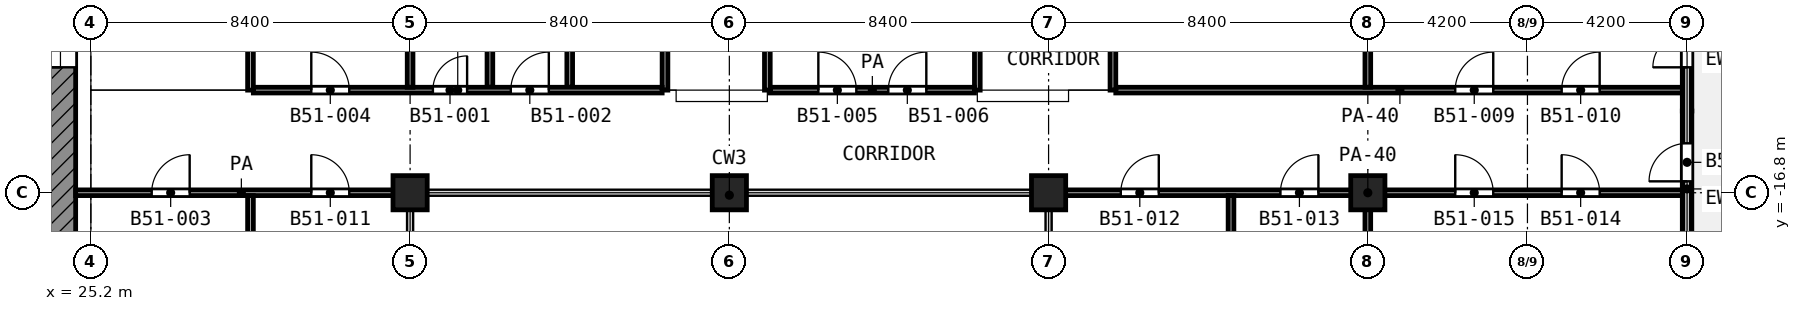
"""IFC4 building model, lengths in metres.
Left out: names, types, materials, properties, quantities, classifications, styles, units other than length and angle.
Written with IfcOpenShell. Run it as: python <this file> out.ifc"""

import sys

from ifc_helpers import new_model, si_unit, direction, frame, frame_2d, origin, origin_2d, place, context, subcontext, project, spatial, rectangle, extrude, element, fill, save


model = new_model("IFC4")
c1 = context("Model", 3, precision=1e-05, world=origin(), true_north=direction((0.0, 1.0)))
c2 = subcontext(c1, "Body", "Model", "MODEL_VIEW")
j1 = project(units=[si_unit("LENGTHUNIT", "METRE"), si_unit("PLANEANGLEUNIT", "RADIAN")], contexts=[c1])
p1 = place(None, origin())
s1 = spatial("IfcSite", under=j1, at=p1, CompositionType="ELEMENT")
p2 = place(p1, origin())
s2 = spatial("IfcBuilding", under=s1, at=p2, CompositionType="ELEMENT")
p3 = place(p2, frame((0.0, 0.0, 222.2)))
s3 = spatial("IfcBuildingStorey", under=s2, at=p3, CompositionType="ELEMENT", Elevation=222.2)
for number, where, z_axis, x_axis in (
    (1, (33.6, -16.8, 0.0), (0.0, 0.0, 1.0), (1.0, 0.0, 0.0)),
    (2, (42.0, -16.8, 0.0), (0.0, 0.0, 1.0), (1.0, 0.0, 0.0)),
    (3, (50.4, -16.8, 0.0), (0.0, 0.0, 1.0), (1.0, 0.0, 0.0)),
    (4, (58.8, -16.8, 0.0), (0.0, 0.0, 1.0), (1.0, 0.0, 0.0)),
):
    element("IfcColumn", number, at=place(p3, frame(where, z_axis=z_axis, x_axis=x_axis)), inside=s3, PredefinedType="COLUMN", context=c2, shape_type="SweptSolid", body=[
        extrude(rectangle(XDim=0.9, YDim=0.9, at=origin_2d()), origin(), (0.0, 0.0, 1.0), 4.2),
    ])
p4 = place(p3, frame((67.2, -18.75, 0.0), z_axis=(0.0, 0.0, 1.0), x_axis=(0.0, 1.0, 0.0)))
e5 = element("IfcWall", 5, at=p4, inside=s3, PredefinedType="SOLIDWALL", context=c2, shape_type="SweptSolid", body=[
    extrude(rectangle(XDim=4.1, YDim=0.25, at=frame_2d((2.05, 0.0))), origin(), (0.0, 0.0, 1.0), 2.58),
])
p5 = place(p4, frame((2.25, 0.0, 0.0)))
e6 = element("IfcOpeningElement", 6, at=p5, cuts=e5, PredefinedType="OPENING", context=c2, shape_type="SweptSolid", body=[
    extrude(rectangle(XDim=1.0, YDim=2.1, at=frame_2d((0.5, 1.05))), frame((0.0, 0.135, 0.0), z_axis=(0.0, -1.0, 0.0), x_axis=(1.0, 0.0, 0.0)), (0.0, 0.0, 1.0), 0.27),
])
p6 = place(p3, frame((67.2, -14.65, 0.0), z_axis=(0.0, 0.0, 1.0), x_axis=(0.0, 1.0, 0.0)))
e7 = element("IfcWall", 7, at=p6, inside=s3, PredefinedType="SOLIDWALL", context=c2, shape_type="SweptSolid", body=[
    extrude(rectangle(XDim=4.1, YDim=0.25, at=frame_2d((2.05, 0.0))), origin(), (0.0, 0.0, 1.0), 2.58),
])
p7 = place(p6, frame((1.15, 0.0, 0.0)))
e8 = element("IfcOpeningElement", 8, at=p7, cuts=e7, PredefinedType="OPENING", context=c2, shape_type="SweptSolid", body=[
    extrude(rectangle(XDim=1.8, YDim=2.1, at=frame_2d((0.9, 1.05))), frame((0.0, 0.135, 0.0), z_axis=(0.0, -1.0, 0.0), x_axis=(1.0, 0.0, 0.0)), (0.0, 0.0, 1.0), 0.27),
])
p8 = place(p3, frame((24.4, -24.0, 0.0), z_axis=(0.0, 0.0, 1.0), x_axis=(0.0, 1.0, 0.0)))
e9 = element("IfcWall", 9, at=p8, inside=s3, PredefinedType="SHEAR", context=c2, shape_type="SweptSolid", body=[
    extrude(rectangle(XDim=18.6, YDim=0.8, at=frame_2d((9.3, 0.0))), origin(), (0.0, 0.0, 1.0), 3.6),
])
p9 = place(p8, frame((10.5, 0.0, 0.0)))
e10 = element("IfcOpeningElement", 10, at=p9, cuts=e9, PredefinedType="OPENING", context=c2, shape_type="SweptSolid", body=[
    extrude(rectangle(XDim=1.8, YDim=2.1, at=frame_2d((0.9, 1.05))), frame((0.0, 0.41, 0.0), z_axis=(0.0, -1.0, 0.0), x_axis=(1.0, 0.0, 0.0)), (0.0, 0.0, 1.0), 0.82),
])
p10 = place(p3, frame((24.8, -16.8, 0.0), z_axis=(0.0, 0.0, 1.0), x_axis=(1.0, 0.0, 0.0)))
e11 = element("IfcWall", 11, at=p10, inside=s3, PredefinedType="PARTITIONING", context=c2, shape_type="SweptSolid", body=[
    extrude(rectangle(XDim=8.72, YDim=0.15, at=frame_2d((4.36, 0.0))), origin(), (0.0, 0.0, 1.0), 3.6),
])
p11 = place(p10, frame((2.0, 0.0, 0.0)))
e12 = element("IfcOpeningElement", 12, at=p11, cuts=e11, PredefinedType="OPENING", context=c2, shape_type="SweptSolid", body=[
    extrude(rectangle(XDim=1.0, YDim=2.1, at=frame_2d((0.5, 1.05))), frame((0.0, 0.085, 0.0), z_axis=(0.0, -1.0, 0.0), x_axis=(1.0, 0.0, 0.0)), (0.0, 0.0, 1.0), 0.17),
])
p12 = place(p10, frame((6.2, 0.0, 0.0)))
e13 = element("IfcOpeningElement", 13, at=p12, cuts=e11, PredefinedType="OPENING", context=c2, shape_type="SweptSolid", body=[
    extrude(rectangle(XDim=1.0, YDim=2.1, at=frame_2d((0.5, 1.05))), frame((0.0, 0.085, 0.0), z_axis=(0.0, -1.0, 0.0), x_axis=(1.0, 0.0, 0.0)), (0.0, 0.0, 1.0), 0.17),
])
p13 = place(p3, frame((50.48, -16.8, 0.0), z_axis=(0.0, 0.0, 1.0), x_axis=(1.0, 0.0, 0.0)))
e14 = element("IfcWall", 14, at=p13, inside=s3, PredefinedType="PARTITIONING", context=c2, shape_type="SweptSolid", body=[
    extrude(rectangle(XDim=16.64, YDim=0.15, at=frame_2d((8.32, 0.0))), origin(), (0.0, 0.0, 1.0), 2.7),
])
p14 = place(p13, frame((1.82, 0.0, 0.0)))
e15 = element("IfcOpeningElement", 15, at=p14, cuts=e14, PredefinedType="OPENING", context=c2, shape_type="SweptSolid", body=[
    extrude(rectangle(XDim=1.0, YDim=2.1, at=frame_2d((0.5, 1.05))), frame((0.0, 0.085, 0.0), z_axis=(0.0, -1.0, 0.0), x_axis=(1.0, 0.0, 0.0)), (0.0, 0.0, 1.0), 0.17),
])
p15 = place(p13, frame((6.02, 0.0, 0.0)))
e16 = element("IfcOpeningElement", 16, at=p15, cuts=e14, PredefinedType="OPENING", context=c2, shape_type="SweptSolid", body=[
    extrude(rectangle(XDim=1.0, YDim=2.1, at=frame_2d((0.5, 1.05))), frame((0.0, 0.085, 0.0), z_axis=(0.0, -1.0, 0.0), x_axis=(1.0, 0.0, 0.0)), (0.0, 0.0, 1.0), 0.17),
])
p16 = place(p13, frame((13.42, 0.0, 0.0)))
e17 = element("IfcOpeningElement", 17, at=p16, cuts=e14, PredefinedType="OPENING", context=c2, shape_type="SweptSolid", body=[
    extrude(rectangle(XDim=1.0, YDim=2.1, at=frame_2d((0.5, 1.05))), frame((0.0, 0.085, 0.0), z_axis=(0.0, -1.0, 0.0), x_axis=(1.0, 0.0, 0.0)), (0.0, 0.0, 1.0), 0.17),
])
p17 = place(p13, frame((10.62, 0.0, 0.0)))
e18 = element("IfcOpeningElement", 18, at=p17, cuts=e14, PredefinedType="OPENING", context=c2, shape_type="SweptSolid", body=[
    extrude(rectangle(XDim=1.0, YDim=2.1, at=frame_2d((0.5, 1.05))), frame((0.0, 0.085, 0.0), z_axis=(0.0, -1.0, 0.0), x_axis=(1.0, 0.0, 0.0)), (0.0, 0.0, 1.0), 0.17),
])
p18 = place(p3, frame((29.475, -14.1, 0.0), z_axis=(0.0, 0.0, 1.0), x_axis=(1.0, 0.0, 0.0)))
e19 = element("IfcWall", 19, at=p18, inside=s3, PredefinedType="PARTITIONING", context=c2, shape_type="SweptSolid", body=[
    extrude(rectangle(XDim=10.757, YDim=0.15, at=frame_2d((5.378, 0.0))), origin(), (0.0, 0.0, 1.0), 3.6),
])
p19 = place(p18, frame((1.525, 0.0, 0.0)))
e20 = element("IfcOpeningElement", 20, at=p19, cuts=e19, PredefinedType="OPENING", context=c2, shape_type="SweptSolid", body=[
    extrude(rectangle(XDim=1.0, YDim=2.1, at=frame_2d((0.5, 1.05))), frame((0.0, 0.085, 0.0), z_axis=(0.0, -1.0, 0.0), x_axis=(1.0, 0.0, 0.0)), (0.0, 0.0, 1.0), 0.17),
])
p20 = place(p18, frame((4.725, 0.0, 0.0)))
e21 = element("IfcOpeningElement", 21, at=p20, cuts=e19, PredefinedType="OPENING", context=c2, shape_type="SweptSolid", body=[
    extrude(rectangle(XDim=0.9, YDim=2.1, at=frame_2d((0.45, 1.05))), frame((0.0, 0.085, 0.0), z_axis=(0.0, -1.0, 0.0), x_axis=(1.0, 0.0, 0.0)), (0.0, 0.0, 1.0), 0.17),
])
p21 = place(p18, frame((6.775, 0.0, 0.0)))
e22 = element("IfcOpeningElement", 22, at=p21, cuts=e19, PredefinedType="OPENING", context=c2, shape_type="SweptSolid", body=[
    extrude(rectangle(XDim=1.0, YDim=2.1, at=frame_2d((0.5, 1.05))), frame((0.0, 0.085, 0.0), z_axis=(0.0, -1.0, 0.0), x_axis=(1.0, 0.0, 0.0)), (0.0, 0.0, 1.0), 0.17),
])
p22 = place(p3, frame((43.075, -14.1, 0.0), z_axis=(0.0, 0.0, 1.0), x_axis=(1.0, 0.0, 0.0)))
e23 = element("IfcWall", 23, at=p22, inside=s3, PredefinedType="PARTITIONING", context=c2, shape_type="SweptSolid", body=[
    extrude(rectangle(XDim=5.375, YDim=0.15, at=frame_2d((2.688, 0.0))), origin(), (0.0, 0.0, 1.0), 3.6),
])
p23 = place(p22, frame((1.267, 0.0, 0.0)))
e24 = element("IfcOpeningElement", 24, at=p23, cuts=e23, PredefinedType="OPENING", context=c2, shape_type="SweptSolid", body=[
    extrude(rectangle(XDim=1.0, YDim=2.1, at=frame_2d((0.5, 1.05))), frame((0.0, 0.085, 0.0), z_axis=(0.0, -1.0, 0.0), x_axis=(1.0, 0.0, 0.0)), (0.0, 0.0, 1.0), 0.17),
])
p24 = place(p22, frame((3.108, 0.0, 0.0)))
e25 = element("IfcOpeningElement", 25, at=p24, cuts=e23, PredefinedType="OPENING", context=c2, shape_type="SweptSolid", body=[
    extrude(rectangle(XDim=1.0, YDim=2.1, at=frame_2d((0.5, 1.05))), frame((0.0, 0.085, 0.0), z_axis=(0.0, -1.0, 0.0), x_axis=(1.0, 0.0, 0.0)), (0.0, 0.0, 1.0), 0.17),
])
p25 = place(p3, frame((52.168, -14.1, 0.0), z_axis=(0.0, 0.0, 1.0), x_axis=(1.0, 0.0, 0.0)))
e26 = element("IfcWall", 26, at=p25, inside=s3, PredefinedType="PARTITIONING", context=c2, shape_type="SweptSolid", body=[
    extrude(rectangle(XDim=14.952, YDim=0.15, at=frame_2d((7.476, 0.0))), origin(), (0.0, 0.0, 1.0), 2.7),
])
p26 = place(p25, frame((8.932, 0.0, 0.0)))
e27 = element("IfcOpeningElement", 27, at=p26, cuts=e26, PredefinedType="OPENING", context=c2, shape_type="SweptSolid", body=[
    extrude(rectangle(XDim=1.0, YDim=2.1, at=frame_2d((0.5, 1.05))), frame((0.0, 0.085, 0.0), z_axis=(0.0, -1.0, 0.0), x_axis=(1.0, 0.0, 0.0)), (0.0, 0.0, 1.0), 0.17),
])
p27 = place(p25, frame((11.732, 0.0, 0.0)))
e28 = element("IfcOpeningElement", 28, at=p27, cuts=e26, PredefinedType="OPENING", context=c2, shape_type="SweptSolid", body=[
    extrude(rectangle(XDim=1.0, YDim=2.1, at=frame_2d((0.5, 1.05))), frame((0.0, 0.085, 0.0), z_axis=(0.0, -1.0, 0.0), x_axis=(1.0, 0.0, 0.0)), (0.0, 0.0, 1.0), 0.17),
])
p28 = place(p3, frame((29.4, -25.2, 0.0), z_axis=(0.0, 0.0, 1.0), x_axis=(0.0, 1.0, 0.0)))
e29 = element("IfcWall", 29, at=p28, inside=s3, PredefinedType="PARTITIONING", context=c2, shape_type="SweptSolid", body=[
    extrude(rectangle(XDim=8.325, YDim=0.15, at=frame_2d((4.163, 0.0))), origin(), (0.0, 0.0, 1.0), 3.6),
])
p29 = place(p3, frame((29.4, -14.1, 0.0), z_axis=(0.0, 0.0, 1.0), x_axis=(0.0, 1.0, 0.0)))
e30 = element("IfcWall", 30, at=p29, inside=s3, PredefinedType="PARTITIONING", context=c2, shape_type="SweptSolid", body=[
    extrude(rectangle(XDim=2.998, YDim=0.15, at=frame_2d((1.499, 0.0))), origin(), (0.0, 0.0, 1.0), 3.6),
])
p30 = place(p3, frame((33.6, -14.025, 0.0), z_axis=(0.0, 0.0, 1.0), x_axis=(0.0, 1.0, 0.0)))
e31 = element("IfcWall", 31, at=p30, inside=s3, PredefinedType="PARTITIONING", context=c2, shape_type="SweptSolid", body=[
    extrude(rectangle(XDim=5.175, YDim=0.15, at=frame_2d((2.587, 0.0))), origin(), (0.0, 0.0, 1.0), 3.6),
])
for number, where, z_axis, x_axis in (
    (32, (35.7, -14.025, 0.0), (0.0, 0.0, 1.0), (0.0, 1.0, 0.0)),
    (33, (37.8, -14.025, 0.0), (0.0, 0.0, 1.0), (0.0, 1.0, 0.0)),
):
    element("IfcWall", number, at=place(p3, frame(where, z_axis=z_axis, x_axis=x_axis)), inside=s3, PredefinedType="PARTITIONING", context=c2, shape_type="SweptSolid", body=[
        extrude(rectangle(XDim=13.945, YDim=0.15, at=frame_2d((6.972, 0.0))), origin(), (0.0, 0.0, 1.0), 3.6),
    ])
p31 = place(p3, frame((40.307, -14.1, 0.0), z_axis=(0.0, 0.0, 1.0), x_axis=(0.0, 1.0, 0.0)))
e34 = element("IfcWall", 34, at=p31, inside=s3, PredefinedType="PARTITIONING", context=c2, shape_type="SweptSolid", body=[
    extrude(rectangle(XDim=14.02, YDim=0.15, at=frame_2d((7.01, 0.0))), origin(), (0.0, 0.0, 1.0), 3.6),
])
p32 = place(p31, frame((4.2, 0.0, 0.0)))
e35 = element("IfcOpeningElement", 35, at=p32, cuts=e34, PredefinedType="OPENING", context=c2, shape_type="SweptSolid", body=[
    extrude(rectangle(XDim=1.0, YDim=2.1, at=frame_2d((0.5, 1.05))), frame((0.0, 0.085, 0.0), z_axis=(0.0, -1.0, 0.0), x_axis=(1.0, 0.0, 0.0)), (0.0, 0.0, 1.0), 0.17),
])
p33 = place(p31, frame((8.9, 0.0, 0.0)))
e36 = element("IfcOpeningElement", 36, at=p33, cuts=e34, PredefinedType="OPENING", context=c2, shape_type="SweptSolid", body=[
    extrude(rectangle(XDim=1.0, YDim=2.1, at=frame_2d((0.5, 1.05))), frame((0.0, 0.085, 0.0), z_axis=(0.0, -1.0, 0.0), x_axis=(1.0, 0.0, 0.0)), (0.0, 0.0, 1.0), 0.17),
])
p34 = place(p3, frame((43.0, -14.1, 0.0), z_axis=(0.0, 0.0, 1.0), x_axis=(0.0, 1.0, 0.0)))
e37 = element("IfcWall", 37, at=p34, inside=s3, PredefinedType="PARTITIONING", context=c2, shape_type="SweptSolid", body=[
    extrude(rectangle(XDim=5.25, YDim=0.15, at=frame_2d((2.625, 0.0))), origin(), (0.0, 0.0, 1.0), 3.6),
])
p35 = place(p3, frame((48.525, -14.1, 0.0), z_axis=(0.0, 0.0, 1.0), x_axis=(0.0, 1.0, 0.0)))
e38 = element("IfcWall", 38, at=p35, inside=s3, PredefinedType="PARTITIONING", context=c2, shape_type="SweptSolid", body=[
    extrude(rectangle(XDim=5.45, YDim=0.15, at=frame_2d((2.725, 0.0))), origin(), (0.0, 0.0, 1.0), 3.6),
])
p36 = place(p3, frame((52.093, -14.1, 0.0), z_axis=(0.0, 0.0, 1.0), x_axis=(0.0, 1.0, 0.0)))
e39 = element("IfcWall", 39, at=p36, inside=s3, PredefinedType="PARTITIONING", context=c2, shape_type="SweptSolid", body=[
    extrude(rectangle(XDim=12.248, YDim=0.15, at=frame_2d((6.124, 0.0))), origin(), (0.0, 0.0, 1.0), 3.6),
])
p37 = place(p36, frame((7.665, 0.0, 0.0)))
e40 = element("IfcOpeningElement", 40, at=p37, cuts=e39, PredefinedType="OPENING", context=c2, shape_type="SweptSolid", body=[
    extrude(rectangle(XDim=1.0, YDim=2.1, at=frame_2d((0.5, 1.05))), frame((0.0, 0.085, 0.0), z_axis=(0.0, -1.0, 0.0), x_axis=(1.0, 0.0, 0.0)), (0.0, 0.0, 1.0), 0.17),
])
p38 = place(p36, frame((3.583, 0.0, 0.0)))
e41 = element("IfcOpeningElement", 41, at=p38, cuts=e39, PredefinedType="OPENING", context=c2, shape_type="SweptSolid", body=[
    extrude(rectangle(XDim=1.0, YDim=2.1, at=frame_2d((0.5, 1.05))), frame((0.0, 0.085, 0.0), z_axis=(0.0, -1.0, 0.0), x_axis=(1.0, 0.0, 0.0)), (0.0, 0.0, 1.0), 0.17),
])
for number, where, z_axis, x_axis in (
    (42, (55.2, -25.12, 0.0), (0.0, 0.0, 1.0), (0.0, 1.0, 0.0)),
    (43, (58.8, -25.12, 0.0), (0.0, 0.0, 1.0), (0.0, 1.0, 0.0)),
):
    element("IfcWall", number, at=place(p3, frame(where, z_axis=z_axis, x_axis=x_axis)), inside=s3, PredefinedType="PARTITIONING", context=c2, shape_type="SweptSolid", body=[
        extrude(rectangle(XDim=8.245, YDim=0.15, at=frame_2d((4.123, 0.0))), origin(), (0.0, 0.0, 1.0), 3.6),
    ])
p39 = place(p3, frame((58.8, -14.025, 0.0), z_axis=(0.0, 0.0, 1.0), x_axis=(0.0, 1.0, 0.0)))
e44 = element("IfcWall", 44, at=p39, inside=s3, PredefinedType="PARTITIONING", context=c2, shape_type="SweptSolid", body=[
    extrude(rectangle(XDim=13.945, YDim=0.15, at=frame_2d((6.972, 0.0))), origin(), (0.0, 0.0, 1.0), 3.6),
])
p40 = place(p5, origin())
e45 = element("IfcDoor", 45, at=p40, inside=s3, OperationType="SINGLE_SWING_LEFT", PredefinedType="DOOR", context=c2, shape_type="SweptSolid", body=[
    extrude(rectangle(XDim=1.0, YDim=2.1, at=frame_2d((0.5, 1.05))), frame((0.0, 0.025, 0.0), z_axis=(0.0, -1.0, 0.0), x_axis=(1.0, 0.0, 0.0)), (0.0, 0.0, 1.0), 0.05),
])
fill(e6, e45)
p41 = place(p7, origin())
e46 = element("IfcDoor", 46, at=p41, inside=s3, OperationType="DOUBLE_DOOR_SINGLE_SWING", PredefinedType="DOOR", context=c2, shape_type="SweptSolid", body=[
    extrude(rectangle(XDim=1.8, YDim=2.1, at=frame_2d((0.9, 1.05))), frame((0.0, 0.025, 0.0), z_axis=(0.0, -1.0, 0.0), x_axis=(1.0, 0.0, 0.0)), (0.0, 0.0, 1.0), 0.05),
])
fill(e8, e46)
p42 = place(p9, origin())
e47 = element("IfcDoor", 47, at=p42, inside=s3, OperationType="DOUBLE_DOOR_SINGLE_SWING", PredefinedType="DOOR", context=c2, shape_type="SweptSolid", body=[
    extrude(rectangle(XDim=1.8, YDim=2.1, at=frame_2d((0.9, 1.05))), frame((0.0, 0.025, 0.0), z_axis=(0.0, -1.0, 0.0), x_axis=(1.0, 0.0, 0.0)), (0.0, 0.0, 1.0), 0.05),
])
fill(e10, e47)
p43 = place(p11, origin())
e48 = element("IfcDoor", 48, at=p43, inside=s3, OperationType="SINGLE_SWING_RIGHT", PredefinedType="DOOR", context=c2, shape_type="SweptSolid", body=[
    extrude(rectangle(XDim=1.0, YDim=2.1, at=frame_2d((0.5, 1.05))), frame((0.0, 0.025, 0.0), z_axis=(0.0, -1.0, 0.0), x_axis=(1.0, 0.0, 0.0)), (0.0, 0.0, 1.0), 0.05),
])
fill(e12, e48)
p44 = place(p19, origin())
e49 = element("IfcDoor", 49, at=p44, inside=s3, OperationType="SINGLE_SWING_LEFT", PredefinedType="DOOR", context=c2, shape_type="SweptSolid", body=[
    extrude(rectangle(XDim=1.0, YDim=2.1, at=frame_2d((0.5, 1.05))), frame((0.0, 0.025, 0.0), z_axis=(0.0, -1.0, 0.0), x_axis=(1.0, 0.0, 0.0)), (0.0, 0.0, 1.0), 0.05),
])
fill(e20, e49)
p45 = place(p23, origin())
e50 = element("IfcDoor", 50, at=p45, inside=s3, OperationType="SINGLE_SWING_LEFT", PredefinedType="DOOR", context=c2, shape_type="SweptSolid", body=[
    extrude(rectangle(XDim=1.0, YDim=2.1, at=frame_2d((0.5, 1.05))), frame((0.0, 0.025, 0.0), z_axis=(0.0, -1.0, 0.0), x_axis=(1.0, 0.0, 0.0)), (0.0, 0.0, 1.0), 0.05),
])
fill(e24, e50)
p46 = place(p24, origin())
e51 = element("IfcDoor", 51, at=p46, inside=s3, OperationType="SINGLE_SWING_RIGHT", PredefinedType="DOOR", context=c2, shape_type="SweptSolid", body=[
    extrude(rectangle(XDim=1.0, YDim=2.1, at=frame_2d((0.5, 1.05))), frame((0.0, 0.025, 0.0), z_axis=(0.0, -1.0, 0.0), x_axis=(1.0, 0.0, 0.0)), (0.0, 0.0, 1.0), 0.05),
])
fill(e25, e51)
p47 = place(p26, origin())
e52 = element("IfcDoor", 52, at=p47, inside=s3, OperationType="SINGLE_SWING_RIGHT", PredefinedType="DOOR", context=c2, shape_type="SweptSolid", body=[
    extrude(rectangle(XDim=1.0, YDim=2.1, at=frame_2d((0.5, 1.05))), frame((0.0, 0.025, 0.0), z_axis=(0.0, -1.0, 0.0), x_axis=(1.0, 0.0, 0.0)), (0.0, 0.0, 1.0), 0.05),
])
fill(e27, e52)
p48 = place(p27, origin())
e53 = element("IfcDoor", 53, at=p48, inside=s3, OperationType="SINGLE_SWING_RIGHT", PredefinedType="DOOR", context=c2, shape_type="SweptSolid", body=[
    extrude(rectangle(XDim=1.0, YDim=2.1, at=frame_2d((0.5, 1.05))), frame((0.0, 0.025, 0.0), z_axis=(0.0, -1.0, 0.0), x_axis=(1.0, 0.0, 0.0)), (0.0, 0.0, 1.0), 0.05),
])
fill(e28, e53)
p49 = place(p12, origin())
e54 = element("IfcDoor", 54, at=p49, inside=s3, OperationType="SINGLE_SWING_LEFT", PredefinedType="DOOR", context=c2, shape_type="SweptSolid", body=[
    extrude(rectangle(XDim=1.0, YDim=2.1, at=frame_2d((0.5, 1.05))), frame((0.0, 0.025, 0.0), z_axis=(0.0, -1.0, 0.0), x_axis=(1.0, 0.0, 0.0)), (0.0, 0.0, 1.0), 0.05),
])
fill(e13, e54)
p50 = place(p14, origin())
e55 = element("IfcDoor", 55, at=p50, inside=s3, OperationType="SINGLE_SWING_RIGHT", PredefinedType="DOOR", context=c2, shape_type="SweptSolid", body=[
    extrude(rectangle(XDim=1.0, YDim=2.1, at=frame_2d((0.5, 1.05))), frame((0.0, 0.025, 0.0), z_axis=(0.0, -1.0, 0.0), x_axis=(1.0, 0.0, 0.0)), (0.0, 0.0, 1.0), 0.05),
])
fill(e15, e55)
p51 = place(p15, origin())
e56 = element("IfcDoor", 56, at=p51, inside=s3, OperationType="SINGLE_SWING_RIGHT", PredefinedType="DOOR", context=c2, shape_type="SweptSolid", body=[
    extrude(rectangle(XDim=1.0, YDim=2.1, at=frame_2d((0.5, 1.05))), frame((0.0, 0.025, 0.0), z_axis=(0.0, -1.0, 0.0), x_axis=(1.0, 0.0, 0.0)), (0.0, 0.0, 1.0), 0.05),
])
fill(e16, e56)
p52 = place(p16, origin())
e57 = element("IfcDoor", 57, at=p52, inside=s3, OperationType="SINGLE_SWING_LEFT", PredefinedType="DOOR", context=c2, shape_type="SweptSolid", body=[
    extrude(rectangle(XDim=1.0, YDim=2.1, at=frame_2d((0.5, 1.05))), frame((0.0, 0.025, 0.0), z_axis=(0.0, -1.0, 0.0), x_axis=(1.0, 0.0, 0.0)), (0.0, 0.0, 1.0), 0.05),
])
fill(e17, e57)
p53 = place(p17, origin())
e58 = element("IfcDoor", 58, at=p53, inside=s3, OperationType="SINGLE_SWING_LEFT", PredefinedType="DOOR", context=c2, shape_type="SweptSolid", body=[
    extrude(rectangle(XDim=1.0, YDim=2.1, at=frame_2d((0.5, 1.05))), frame((0.0, 0.025, 0.0), z_axis=(0.0, -1.0, 0.0), x_axis=(1.0, 0.0, 0.0)), (0.0, 0.0, 1.0), 0.05),
])
fill(e18, e58)
p54 = place(p20, origin())
e59 = element("IfcDoor", 59, at=p54, inside=s3, OperationType="SINGLE_SWING_RIGHT", PredefinedType="DOOR", context=c2, shape_type="SweptSolid", body=[
    extrude(rectangle(XDim=0.9, YDim=2.1, at=frame_2d((0.45, 1.05))), frame((0.0, 0.025, 0.0), z_axis=(0.0, -1.0, 0.0), x_axis=(1.0, 0.0, 0.0)), (0.0, 0.0, 1.0), 0.05),
])
fill(e21, e59)
p55 = place(p21, origin())
e60 = element("IfcDoor", 60, at=p55, inside=s3, OperationType="SINGLE_SWING_RIGHT", PredefinedType="DOOR", context=c2, shape_type="SweptSolid", body=[
    extrude(rectangle(XDim=1.0, YDim=2.1, at=frame_2d((0.5, 1.05))), frame((0.0, 0.025, 0.0), z_axis=(0.0, -1.0, 0.0), x_axis=(1.0, 0.0, 0.0)), (0.0, 0.0, 1.0), 0.05),
])
fill(e22, e60)
save(model, sys.argv[1])
